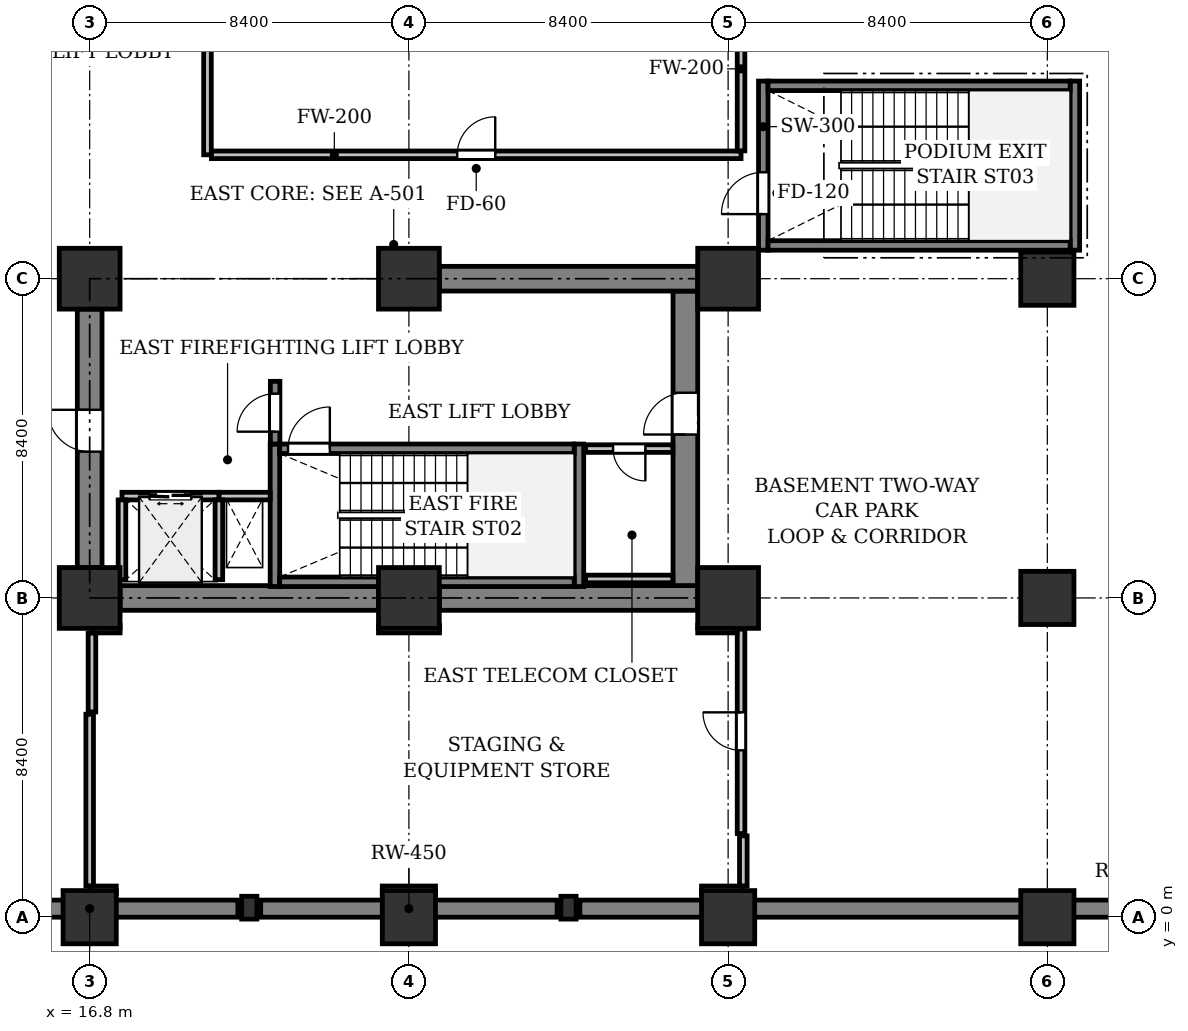
"""IFC4 building model, lengths in metres.
Left out: names, types, materials, properties, quantities, classifications, styles, units other than length and angle.
Written with IfcOpenShell. Run it as: python <this file> out.ifc"""

import sys

from ifc_helpers import new_model, si_unit, direction, frame, frame_2d, origin, origin_2d, place, context, subcontext, project, spatial, rectangle, extrude, element, fill, save


model = new_model("IFC4")
c1 = context("Model", 3, precision=1e-05, world=origin(), true_north=direction((0.0, 1.0)))
c2 = subcontext(c1, "Body", "Model", "MODEL_VIEW")
j1 = project(units=[si_unit("LENGTHUNIT", "METRE"), si_unit("PLANEANGLEUNIT", "RADIAN")], contexts=[c1])
p1 = place(None, origin())
s1 = spatial("IfcSite", under=j1, at=p1, CompositionType="ELEMENT")
p2 = place(p1, origin())
s2 = spatial("IfcBuilding", under=s1, at=p2, CompositionType="ELEMENT")
p3 = place(p2, frame((0.0, 0.0, -4.8)))
s3 = spatial("IfcBuildingStorey", under=s2, at=p3, CompositionType="ELEMENT", Elevation=-4.8)
for number, where, z_axis, x_axis in (
    (1, (12.9, 0.225, 0.0), (0.0, 0.0, 1.0), (1.0, 0.0, 0.0)),
    (2, (21.3, 0.225, 0.0), (0.0, 0.0, 1.0), (1.0, 0.0, 0.0)),
):
    element("IfcWall", number, at=place(p3, frame(where, z_axis=z_axis, x_axis=x_axis)), inside=s3, PredefinedType="SOLIDWALL", context=c2, shape_type="SweptSolid", body=[
        extrude(rectangle(XDim=7.8, YDim=0.45, at=frame_2d((3.9, 0.0))), origin(), (0.0, 0.0, 1.0), 4.48),
    ])
p4 = place(p3, frame((29.7, 0.225, 0.0), z_axis=(0.0, 0.0, 1.0), x_axis=(1.0, 0.0, 0.0)))
e3 = element("IfcWall", 3, at=p4, inside=s3, PredefinedType="SOLIDWALL", context=c2, shape_type="SweptSolid", body=[
    extrude(rectangle(XDim=29.1, YDim=0.45, at=frame_2d((14.55, 0.0))), origin(), (0.0, 0.0, 1.0), 4.48),
])
p5 = place(p3, frame((16.8, 0.0, 0.0), z_axis=(0.0, 0.0, 1.0), x_axis=(1.0, 0.0, 0.0)))
e4 = element("IfcColumn", 4, at=p5, inside=s3, PredefinedType="COLUMN", context=c2, shape_type="SweptSolid", body=[
    extrude(rectangle(XDim=1.4, YDim=1.4, at=origin_2d()), origin(), (0.0, 0.0, 1.0), 4.8),
])
for number, where, z_axis, x_axis in (
    (5, (16.8, 8.4, 0.0), (0.0, 0.0, 1.0), (1.0, 0.0, 0.0)),
    (6, (16.8, 16.8, 0.0), (0.0, 0.0, 1.0), (1.0, 0.0, 0.0)),
):
    element("IfcColumn", number, at=place(p3, frame(where, z_axis=z_axis, x_axis=x_axis)), inside=s3, PredefinedType="COLUMN", context=c2, shape_type="SweptSolid", body=[
        extrude(rectangle(XDim=1.6, YDim=1.6, at=origin_2d()), origin(), (0.0, 0.0, 1.0), 4.8),
    ])
p6 = place(p3, frame((25.2, 0.0, 0.0), z_axis=(0.0, 0.0, 1.0), x_axis=(1.0, 0.0, 0.0)))
e7 = element("IfcColumn", 7, at=p6, inside=s3, PredefinedType="COLUMN", context=c2, shape_type="SweptSolid", body=[
    extrude(rectangle(XDim=1.4, YDim=1.4, at=origin_2d()), origin(), (0.0, 0.0, 1.0), 4.8),
])
for number, where, z_axis, x_axis in (
    (8, (25.2, 8.4, 0.0), (0.0, 0.0, 1.0), (1.0, 0.0, 0.0)),
    (9, (25.2, 16.8, 0.0), (0.0, 0.0, 1.0), (1.0, 0.0, 0.0)),
):
    element("IfcColumn", number, at=place(p3, frame(where, z_axis=z_axis, x_axis=x_axis)), inside=s3, PredefinedType="COLUMN", context=c2, shape_type="SweptSolid", body=[
        extrude(rectangle(XDim=1.6, YDim=1.6, at=origin_2d()), origin(), (0.0, 0.0, 1.0), 4.8),
    ])
p7 = place(p3, frame((33.6, 0.0, 0.0), z_axis=(0.0, 0.0, 1.0), x_axis=(1.0, 0.0, 0.0)))
e10 = element("IfcColumn", 10, at=p7, inside=s3, PredefinedType="COLUMN", context=c2, shape_type="SweptSolid", body=[
    extrude(rectangle(XDim=1.4, YDim=1.4, at=origin_2d()), origin(), (0.0, 0.0, 1.0), 4.8),
])
for number, where, z_axis, x_axis in (
    (11, (33.6, 8.4, 0.0), (0.0, 0.0, 1.0), (1.0, 0.0, 0.0)),
    (12, (33.6, 16.8, 0.0), (0.0, 0.0, 1.0), (1.0, 0.0, 0.0)),
):
    element("IfcColumn", number, at=place(p3, frame(where, z_axis=z_axis, x_axis=x_axis)), inside=s3, PredefinedType="COLUMN", context=c2, shape_type="SweptSolid", body=[
        extrude(rectangle(XDim=1.6, YDim=1.6, at=origin_2d()), origin(), (0.0, 0.0, 1.0), 4.8),
    ])
for number, where, z_axis, x_axis in (
    (13, (42.0, 0.0, 0.0), (0.0, 0.0, 1.0), (1.0, 0.0, 0.0)),
    (14, (42.0, 8.4, 0.0), (0.0, 0.0, 1.0), (1.0, 0.0, 0.0)),
    (15, (42.0, 16.8, 0.0), (0.0, 0.0, 1.0), (1.0, 0.0, 0.0)),
):
    element("IfcColumn", number, at=place(p3, frame(where, z_axis=z_axis, x_axis=x_axis)), inside=s3, PredefinedType="COLUMN", context=c2, shape_type="SweptSolid", body=[
        extrude(rectangle(XDim=1.4, YDim=1.4, at=origin_2d()), origin(), (0.0, 0.0, 1.0), 4.8),
    ])
for number, where, z_axis, x_axis in (
    (16, (21.0, 0.25, 0.0), (0.0, 0.0, 1.0), (1.0, 0.0, 0.0)),
    (17, (29.4, 0.25, 0.0), (0.0, 0.0, 1.0), (1.0, 0.0, 0.0)),
):
    element("IfcColumn", number, at=place(p3, frame(where, z_axis=z_axis, x_axis=x_axis)), inside=s3, PredefinedType="PILASTER", context=c2, shape_type="SweptSolid", body=[
        extrude(rectangle(XDim=0.4, YDim=0.6, at=origin_2d()), origin(), (0.0, 0.0, 1.0), 4.8),
    ])
p8 = place(p3, frame((17.6, 8.4, 0.0), z_axis=(0.0, 0.0, 1.0), x_axis=(1.0, 0.0, 0.0)))
e18 = element("IfcWall", 18, at=p8, inside=s3, PredefinedType="SHEAR", context=c2, shape_type="SweptSolid", body=[
    extrude(rectangle(XDim=6.8, YDim=0.65, at=frame_2d((3.4, 0.0))), origin(), (0.0, 0.0, 1.0), 4.48),
])
p9 = place(p3, frame((26.0, 8.4, 0.0), z_axis=(0.0, 0.0, 1.0), x_axis=(1.0, 0.0, 0.0)))
e19 = element("IfcWall", 19, at=p9, inside=s3, PredefinedType="SHEAR", context=c2, shape_type="SweptSolid", body=[
    extrude(rectangle(XDim=6.8, YDim=0.65, at=frame_2d((3.4, 0.0))), origin(), (0.0, 0.0, 1.0), 4.48),
])
p10 = place(p3, frame((32.475, 8.725, 0.0), z_axis=(0.0, 0.0, 1.0), x_axis=(0.0, 1.0, 0.0)))
e20 = element("IfcWall", 20, at=p10, inside=s3, PredefinedType="SHEAR", context=c2, shape_type="SweptSolid", body=[
    extrude(rectangle(XDim=7.75, YDim=0.65, at=frame_2d((3.875, 0.0))), origin(), (0.0, 0.0, 1.0), 4.48),
])
p11 = place(p10, frame((3.975, 0.0, 0.0)))
e21 = element("IfcOpeningElement", 21, at=p11, cuts=e20, PredefinedType="OPENING", context=c2, shape_type="SweptSolid", body=[
    extrude(rectangle(XDim=1.1, YDim=2.15, at=frame_2d((0.55, 1.075))), frame((0.0, 0.335, 0.0), z_axis=(0.0, -1.0, 0.0), x_axis=(1.0, 0.0, 0.0)), (0.0, 0.0, 1.0), 0.67),
])
p12 = place(p3, frame((16.8, 9.2, 0.0), z_axis=(0.0, 0.0, 1.0), x_axis=(0.0, 1.0, 0.0)))
e22 = element("IfcWall", 22, at=p12, inside=s3, PredefinedType="SHEAR", context=c2, shape_type="SweptSolid", body=[
    extrude(rectangle(XDim=6.8, YDim=0.65, at=frame_2d((3.4, 0.0))), origin(), (0.0, 0.0, 1.0), 4.48),
])
p13 = place(p12, frame((3.05, 0.0, 0.0)))
e23 = element("IfcOpeningElement", 23, at=p13, cuts=e22, PredefinedType="OPENING", context=c2, shape_type="SweptSolid", body=[
    extrude(rectangle(XDim=1.1, YDim=2.15, at=frame_2d((0.55, 1.075))), frame((0.0, 0.335, 0.0), z_axis=(0.0, -1.0, 0.0), x_axis=(1.0, 0.0, 0.0)), (0.0, 0.0, 1.0), 0.67),
])
p14 = place(p3, frame((26.0, 16.8, 0.0), z_axis=(0.0, 0.0, 1.0), x_axis=(1.0, 0.0, 0.0)))
e24 = element("IfcWall", 24, at=p14, inside=s3, PredefinedType="SHEAR", context=c2, shape_type="SweptSolid", body=[
    extrude(rectangle(XDim=6.8, YDim=0.65, at=frame_2d((3.4, 0.0))), origin(), (0.0, 0.0, 1.0), 4.48),
])
for number, where, z_axis, x_axis in (
    (25, (21.675, 8.7, 0.0), (0.0, 0.0, 1.0), (0.0, 1.0, 0.0)),
    (26, (29.675, 8.7, 0.0), (0.0, 0.0, 1.0), (0.0, 1.0, 0.0)),
):
    element("IfcWall", number, at=place(p3, frame(where, z_axis=z_axis, x_axis=x_axis)), inside=s3, PredefinedType="SHEAR", context=c2, shape_type="SweptSolid", body=[
        extrude(rectangle(XDim=3.75, YDim=0.25, at=frame_2d((1.875, 0.0))), origin(), (0.0, 0.0, 1.0), 4.48),
    ])
p15 = place(p3, frame((21.8, 8.825, 0.0), z_axis=(0.0, 0.0, 1.0), x_axis=(1.0, 0.0, 0.0)))
e27 = element("IfcWall", 27, at=p15, inside=s3, PredefinedType="SHEAR", context=c2, shape_type="SweptSolid", body=[
    extrude(rectangle(XDim=7.75, YDim=0.25, at=frame_2d((3.875, 0.0))), origin(), (0.0, 0.0, 1.0), 4.48),
])
p16 = place(p3, frame((21.8, 12.325, 0.0), z_axis=(0.0, 0.0, 1.0), x_axis=(1.0, 0.0, 0.0)))
e28 = element("IfcWall", 28, at=p16, inside=s3, PredefinedType="SHEAR", context=c2, shape_type="SweptSolid", body=[
    extrude(rectangle(XDim=7.75, YDim=0.25, at=frame_2d((3.875, 0.0))), origin(), (0.0, 0.0, 1.0), 4.48),
])
p17 = place(p16, frame((0.22, 0.0, 0.0)))
e29 = element("IfcOpeningElement", 29, at=p17, cuts=e28, PredefinedType="OPENING", context=c2, shape_type="SweptSolid", body=[
    extrude(rectangle(XDim=1.1, YDim=2.15, at=frame_2d((0.55, 1.075))), frame((0.0, 0.135, 0.0), z_axis=(0.0, -1.0, 0.0), x_axis=(1.0, 0.0, 0.0)), (0.0, 0.0, 1.0), 0.27),
])
p18 = place(p3, frame((34.525, 17.55, 0.0), z_axis=(0.0, 0.0, 1.0), x_axis=(0.0, 1.0, 0.0)))
e30 = element("IfcWall", 30, at=p18, inside=s3, PredefinedType="SHEAR", context=c2, shape_type="SweptSolid", body=[
    extrude(rectangle(XDim=4.45, YDim=0.25, at=frame_2d((2.225, 0.0))), origin(), (0.0, 0.0, 1.0), 4.48),
])
p19 = place(p18, frame((0.95, 0.0, 0.0)))
e31 = element("IfcOpeningElement", 31, at=p19, cuts=e30, PredefinedType="OPENING", context=c2, shape_type="SweptSolid", body=[
    extrude(rectangle(XDim=1.1, YDim=2.15, at=frame_2d((0.55, 1.075))), frame((0.0, 0.135, 0.0), z_axis=(0.0, -1.0, 0.0), x_axis=(1.0, 0.0, 0.0)), (0.0, 0.0, 1.0), 0.27),
])
p20 = place(p3, frame((42.725, 17.55, 0.0), z_axis=(0.0, 0.0, 1.0), x_axis=(0.0, 1.0, 0.0)))
e32 = element("IfcWall", 32, at=p20, inside=s3, PredefinedType="SHEAR", context=c2, shape_type="SweptSolid", body=[
    extrude(rectangle(XDim=4.45, YDim=0.25, at=frame_2d((2.225, 0.0))), origin(), (0.0, 0.0, 1.0), 4.48),
])
for number, where, z_axis, x_axis in (
    (33, (34.65, 17.675, 0.0), (0.0, 0.0, 1.0), (1.0, 0.0, 0.0)),
    (34, (34.65, 21.875, 0.0), (0.0, 0.0, 1.0), (1.0, 0.0, 0.0)),
):
    element("IfcWall", number, at=place(p3, frame(where, z_axis=z_axis, x_axis=x_axis)), inside=s3, PredefinedType="SHEAR", context=c2, shape_type="SweptSolid", body=[
        extrude(rectangle(XDim=7.95, YDim=0.25, at=frame_2d((3.975, 0.0))), origin(), (0.0, 0.0, 1.0), 4.48),
    ])
p21 = place(p3, frame((20.2, 11.08, 0.0), z_axis=(0.0, 0.0, 1.0), x_axis=(1.0, 0.0, 0.0)))
e35 = element("IfcWall", 35, at=p21, inside=s3, PredefinedType="PARTITIONING", context=c2, shape_type="SweptSolid", body=[
    extrude(rectangle(XDim=1.35, YDim=0.2, at=frame_2d((0.675, 0.0))), origin(), (0.0, 0.0, 1.0), 4.48),
])
p22 = place(p3, frame((21.68, 12.45, 0.0), z_axis=(0.0, 0.0, 1.0), x_axis=(0.0, 1.0, 0.0)))
e36 = element("IfcWall", 36, at=p22, inside=s3, PredefinedType="SHEAR", context=c2, shape_type="SweptSolid", body=[
    extrude(rectangle(XDim=1.65, YDim=0.25, at=frame_2d((0.825, 0.0))), origin(), (0.0, 0.0, 1.0), 4.48),
])
p23 = place(p22, frame((0.325, 0.0, 0.0)))
e37 = element("IfcOpeningElement", 37, at=p23, cuts=e36, PredefinedType="OPENING", context=c2, shape_type="SweptSolid", body=[
    extrude(rectangle(XDim=1.0, YDim=2.15, at=frame_2d((0.5, 1.075))), frame((0.0, 0.135, 0.0), z_axis=(0.0, -1.0, 0.0), x_axis=(1.0, 0.0, 0.0)), (0.0, 0.0, 1.0), 0.27),
])
p24 = place(p3, frame((17.65, 11.08, 0.0), z_axis=(0.0, 0.0, 1.0), x_axis=(1.0, 0.0, 0.0)))
e38 = element("IfcWall", 38, at=p24, inside=s3, PredefinedType="PARTITIONING", context=c2, shape_type="SweptSolid", body=[
    extrude(rectangle(XDim=2.55, YDim=0.2, at=frame_2d((1.275, 0.0))), origin(), (0.0, 0.0, 1.0), 4.48),
])
p25 = place(p24, frame((0.725, 0.0, 0.0)))
e39 = element("IfcOpeningElement", 39, at=p25, cuts=e38, PredefinedType="OPENING", context=c2, shape_type="SweptSolid", body=[
    extrude(rectangle(XDim=1.1, YDim=2.2, at=frame_2d((0.55, 1.1))), frame((0.0, 0.11, 0.0), z_axis=(0.0, -1.0, 0.0), x_axis=(1.0, 0.0, 0.0)), (0.0, 0.0, 1.0), 0.22),
])
for number, where, z_axis, x_axis in (
    (40, (20.2, 8.88, 0.0), (0.0, 0.0, 1.0), (0.0, 1.0, 0.0)),
    (41, (17.65, 8.88, 0.0), (0.0, 0.0, 1.0), (0.0, 1.0, 0.0)),
):
    element("IfcWall", number, at=place(p3, frame(where, z_axis=z_axis, x_axis=x_axis)), inside=s3, PredefinedType="PARTITIONING", context=c2, shape_type="SweptSolid", body=[
        extrude(rectangle(XDim=2.1, YDim=0.2, at=frame_2d((1.05, 0.0))), origin(), (0.0, 0.0, 1.0), 4.48),
    ])
p26 = place(p3, frame((32.146, 12.33, 0.0), z_axis=(0.0, 0.0, 1.0), x_axis=(-1.0, 0.0, 0.0)))
e42 = element("IfcWall", 42, at=p26, inside=s3, PredefinedType="PARTITIONING", context=c2, shape_type="SweptSolid", body=[
    extrude(rectangle(XDim=2.296, YDim=0.2, at=frame_2d((1.148, 0.0))), origin(), (0.0, 0.0, 1.0), 4.48),
])
p27 = place(p26, frame((0.723, 0.0, 0.0)))
e43 = element("IfcOpeningElement", 43, at=p27, cuts=e42, PredefinedType="OPENING", context=c2, shape_type="SweptSolid", body=[
    extrude(rectangle(XDim=0.85, YDim=2.15, at=frame_2d((0.425, 1.075))), frame((0.0, 0.11, 0.0), z_axis=(0.0, -1.0, 0.0), x_axis=(1.0, 0.0, 0.0)), (0.0, 0.0, 1.0), 0.22),
])
p28 = place(p3, frame((29.85, 8.9, 0.0), z_axis=(0.0, 0.0, 1.0), x_axis=(1.0, 0.0, 0.0)))
e44 = element("IfcWall", 44, at=p28, inside=s3, PredefinedType="PARTITIONING", context=c2, shape_type="SweptSolid", body=[
    extrude(rectangle(XDim=2.296, YDim=0.2, at=frame_2d((1.148, 0.0))), origin(), (0.0, 0.0, 1.0), 4.48),
])
p29 = place(p3, frame((19.9, 34.44, 0.0), z_axis=(0.0, 0.0, 1.0), x_axis=(0.0, -1.0, 0.0)))
e45 = element("IfcWall", 45, at=p29, inside=s3, PredefinedType="PARTITIONING", context=c2, shape_type="SweptSolid", body=[
    extrude(rectangle(XDim=14.38, YDim=0.2, at=frame_2d((7.19, 0.0))), origin(), (0.0, 0.0, 1.0), 3.78),
])
p30 = place(p3, frame((20.004, 20.06, 0.0), z_axis=(0.0, 0.0, 1.0), x_axis=(1.0, 0.0, 0.0)))
e46 = element("IfcWall", 46, at=p30, inside=s3, PredefinedType="PARTITIONING", context=c2, shape_type="SweptSolid", body=[
    extrude(rectangle(XDim=13.936, YDim=0.2, at=frame_2d((6.968, 0.0))), origin(), (0.0, 0.0, 1.0), 3.868),
])
p31 = place(p30, frame((6.468, 0.0, 0.0)))
e47 = element("IfcOpeningElement", 47, at=p31, cuts=e46, PredefinedType="OPENING", context=c2, shape_type="SweptSolid", body=[
    extrude(rectangle(XDim=1.0, YDim=2.15, at=frame_2d((0.5, 1.075))), frame((0.0, 0.11, 0.0), z_axis=(0.0, -1.0, 0.0), x_axis=(1.0, 0.0, 0.0)), (0.0, 0.0, 1.0), 0.22),
])
p32 = place(p3, frame((33.94, 20.164, 0.0), z_axis=(0.0, 0.0, 1.0), x_axis=(0.0, 1.0, 0.0)))
e48 = element("IfcWall", 48, at=p32, inside=s3, PredefinedType="PARTITIONING", context=c2, shape_type="SweptSolid", body=[
    extrude(rectangle(XDim=4.316, YDim=0.2, at=frame_2d((2.158, 0.0))), origin(), (0.0, 0.0, 1.0), 4.48),
])
p33 = place(p3, frame((16.8, 0.72, 0.0), z_axis=(0.0, 0.0, 1.0), x_axis=(1.0, 0.0, 0.0)))
e49 = element("IfcWall", 49, at=p33, inside=s3, PredefinedType="PARTITIONING", context=c2, shape_type="SweptSolid", body=[
    extrude(rectangle(XDim=0.7, YDim=0.2, at=frame_2d((0.35, 0.0))), origin(), (0.0, 0.0, 1.0), 3.868),
])
p34 = place(p3, frame((24.5, 0.72, 0.0), z_axis=(0.0, 0.0, 1.0), x_axis=(1.0, 0.0, 0.0)))
e50 = element("IfcWall", 50, at=p34, inside=s3, PredefinedType="PARTITIONING", context=c2, shape_type="SweptSolid", body=[
    extrude(rectangle(XDim=1.4, YDim=0.2, at=frame_2d((0.7, 0.0))), origin(), (0.0, 0.0, 1.0), 3.868),
])
p35 = place(p3, frame((32.9, 0.72, 0.0), z_axis=(0.0, 0.0, 1.0), x_axis=(1.0, 0.0, 0.0)))
e51 = element("IfcWall", 51, at=p35, inside=s3, PredefinedType="PARTITIONING", context=c2, shape_type="SweptSolid", body=[
    extrude(rectangle(XDim=1.1, YDim=0.2, at=frame_2d((0.55, 0.0))), origin(), (0.0, 0.0, 1.0), 3.868),
])
p36 = place(p3, frame((34.0, 0.824, 0.0), z_axis=(0.0, 0.0, 1.0), x_axis=(0.0, 1.0, 0.0)))
e52 = element("IfcWall", 52, at=p36, inside=s3, PredefinedType="PARTITIONING", context=c2, shape_type="SweptSolid", body=[
    extrude(rectangle(XDim=1.316, YDim=0.2, at=frame_2d((0.658, 0.0))), origin(), (0.0, 0.0, 1.0), 4.48),
])
p37 = place(p3, frame((33.94, 2.2, 0.0), z_axis=(0.0, 0.0, 1.0), x_axis=(0.0, 1.0, 0.0)))
e53 = element("IfcWall", 53, at=p37, inside=s3, PredefinedType="PARTITIONING", context=c2, shape_type="SweptSolid", body=[
    extrude(rectangle(XDim=5.38, YDim=0.2, at=frame_2d((2.69, 0.0))), origin(), (0.0, 0.0, 1.0), 4.48),
])
p38 = place(p37, frame((2.19, 0.0, 0.0)))
e54 = element("IfcOpeningElement", 54, at=p38, cuts=e53, PredefinedType="OPENING", context=c2, shape_type="SweptSolid", body=[
    extrude(rectangle(XDim=1.0, YDim=2.15, at=frame_2d((0.5, 1.075))), frame((0.0, 0.11, 0.0), z_axis=(0.0, -1.0, 0.0), x_axis=(1.0, 0.0, 0.0)), (0.0, 0.0, 1.0), 0.22),
])
p39 = place(p3, frame((33.836, 7.58, 0.0), z_axis=(0.0, 0.0, 1.0), x_axis=(-1.0, 0.0, 0.0)))
e55 = element("IfcWall", 55, at=p39, inside=s3, PredefinedType="PARTITIONING", context=c2, shape_type="SweptSolid", body=[
    extrude(rectangle(XDim=1.036, YDim=0.2, at=frame_2d((0.518, 0.0))), origin(), (0.0, 0.0, 1.0), 3.868),
])
p40 = place(p3, frame((26.006, 7.581, 0.0), z_axis=(0.0, 0.0, 1.0), x_axis=(-0.999999896002, -0.000456065626, 0.0)))
e56 = element("IfcWall", 56, at=p40, inside=s3, PredefinedType="PARTITIONING", context=c2, shape_type="SweptSolid", body=[
    extrude(rectangle(XDim=1.606, YDim=0.2, at=frame_2d((0.803, 0.0))), origin(), (0.0, 0.0, 1.0), 3.868),
])
p41 = place(p3, frame((17.6, 7.58, 0.0), z_axis=(0.0, 0.0, 1.0), x_axis=(-1.0, 0.0, 0.0)))
e57 = element("IfcWall", 57, at=p41, inside=s3, PredefinedType="PARTITIONING", context=c2, shape_type="SweptSolid", body=[
    extrude(rectangle(XDim=0.74, YDim=0.2, at=frame_2d((0.37, 0.0))), origin(), (0.0, 0.0, 1.0), 3.868),
])
p42 = place(p3, frame((16.86, 7.476, 0.0), z_axis=(0.0, 0.0, 1.0), x_axis=(0.0, -1.0, 0.0)))
e58 = element("IfcWall", 58, at=p42, inside=s3, PredefinedType="PARTITIONING", context=c2, shape_type="SweptSolid", body=[
    extrude(rectangle(XDim=2.076, YDim=0.2, at=frame_2d((1.038, 0.0))), origin(), (0.0, 0.0, 1.0), 3.868),
])
p43 = place(p3, frame((16.8, 5.34, 0.0), z_axis=(0.0, 0.0, 1.0), x_axis=(0.0, -1.0, 0.0)))
e59 = element("IfcWall", 59, at=p43, inside=s3, PredefinedType="PARTITIONING", context=c2, shape_type="SweptSolid", body=[
    extrude(rectangle(XDim=4.516, YDim=0.2, at=frame_2d((2.258, 0.0))), origin(), (0.0, 0.0, 1.0), 3.868),
])
p44 = place(p11, origin())
e60 = element("IfcDoor", 60, at=p44, inside=s3, OperationType="SINGLE_SWING_LEFT", PredefinedType="DOOR", context=c2, shape_type="SweptSolid", body=[
    extrude(rectangle(XDim=1.1, YDim=2.15, at=frame_2d((0.55, 1.075))), frame((0.0, 0.025, 0.0), z_axis=(0.0, -1.0, 0.0), x_axis=(1.0, 0.0, 0.0)), (0.0, 0.0, 1.0), 0.05),
])
fill(e21, e60)
p45 = place(p13, origin())
e61 = element("IfcDoor", 61, at=p45, inside=s3, OperationType="SINGLE_SWING_RIGHT", PredefinedType="DOOR", context=c2, shape_type="SweptSolid", body=[
    extrude(rectangle(XDim=1.1, YDim=2.15, at=frame_2d((0.55, 1.075))), frame((0.0, 0.025, 0.0), z_axis=(0.0, -1.0, 0.0), x_axis=(1.0, 0.0, 0.0)), (0.0, 0.0, 1.0), 0.05),
])
fill(e23, e61)
p46 = place(p17, origin())
e62 = element("IfcDoor", 62, at=p46, inside=s3, OperationType="SINGLE_SWING_RIGHT", PredefinedType="DOOR", context=c2, shape_type="SweptSolid", body=[
    extrude(rectangle(XDim=1.1, YDim=2.15, at=frame_2d((0.55, 1.075))), frame((0.0, 0.025, 0.0), z_axis=(0.0, -1.0, 0.0), x_axis=(1.0, 0.0, 0.0)), (0.0, 0.0, 1.0), 0.05),
])
fill(e29, e62)
p47 = place(p19, origin())
e63 = element("IfcDoor", 63, at=p47, inside=s3, OperationType="SINGLE_SWING_LEFT", PredefinedType="DOOR", context=c2, shape_type="SweptSolid", body=[
    extrude(rectangle(XDim=1.1, YDim=2.15, at=frame_2d((0.55, 1.075))), frame((0.0, 0.025, 0.0), z_axis=(0.0, -1.0, 0.0), x_axis=(1.0, 0.0, 0.0)), (0.0, 0.0, 1.0), 0.05),
])
fill(e31, e63)
p48 = place(p23, origin())
e64 = element("IfcDoor", 64, at=p48, inside=s3, OperationType="SINGLE_SWING_LEFT", PredefinedType="DOOR", context=c2, shape_type="SweptSolid", body=[
    extrude(rectangle(XDim=1.0, YDim=2.15, at=frame_2d((0.5, 1.075))), frame((0.0, 0.025, 0.0), z_axis=(0.0, -1.0, 0.0), x_axis=(1.0, 0.0, 0.0)), (0.0, 0.0, 1.0), 0.05),
])
fill(e37, e64)
p49 = place(p25, origin())
e65 = element("IfcDoor", 65, at=p49, inside=s3, OperationType="DOUBLE_DOOR_SLIDING", PredefinedType="DOOR", context=c2, shape_type="SweptSolid", body=[
    extrude(rectangle(XDim=1.1, YDim=2.2, at=frame_2d((0.55, 1.1))), frame((0.0, 0.025, 0.0), z_axis=(0.0, -1.0, 0.0), x_axis=(1.0, 0.0, 0.0)), (0.0, 0.0, 1.0), 0.05),
])
fill(e39, e65)
p50 = place(p27, origin())
e66 = element("IfcDoor", 66, at=p50, inside=s3, OperationType="SINGLE_SWING_LEFT", PredefinedType="DOOR", context=c2, shape_type="SweptSolid", body=[
    extrude(rectangle(XDim=0.85, YDim=2.15, at=frame_2d((0.425, 1.075))), frame((0.0, 0.025, 0.0), z_axis=(0.0, -1.0, 0.0), x_axis=(1.0, 0.0, 0.0)), (0.0, 0.0, 1.0), 0.05),
])
fill(e43, e66)
p51 = place(p31, origin())
e67 = element("IfcDoor", 67, at=p51, inside=s3, OperationType="SINGLE_SWING_RIGHT", PredefinedType="DOOR", context=c2, shape_type="SweptSolid", body=[
    extrude(rectangle(XDim=1.0, YDim=2.15, at=frame_2d((0.5, 1.075))), frame((0.0, 0.025, 0.0), z_axis=(0.0, -1.0, 0.0), x_axis=(1.0, 0.0, 0.0)), (0.0, 0.0, 1.0), 0.05),
])
fill(e47, e67)
p52 = place(p38, origin())
e68 = element("IfcDoor", 68, at=p52, inside=s3, OperationType="SINGLE_SWING_RIGHT", PredefinedType="DOOR", context=c2, shape_type="SweptSolid", body=[
    extrude(rectangle(XDim=1.0, YDim=2.15, at=frame_2d((0.5, 1.075))), frame((0.0, 0.025, 0.0), z_axis=(0.0, -1.0, 0.0), x_axis=(1.0, 0.0, 0.0)), (0.0, 0.0, 1.0), 0.05),
])
fill(e54, e68)
save(model, sys.argv[1])
